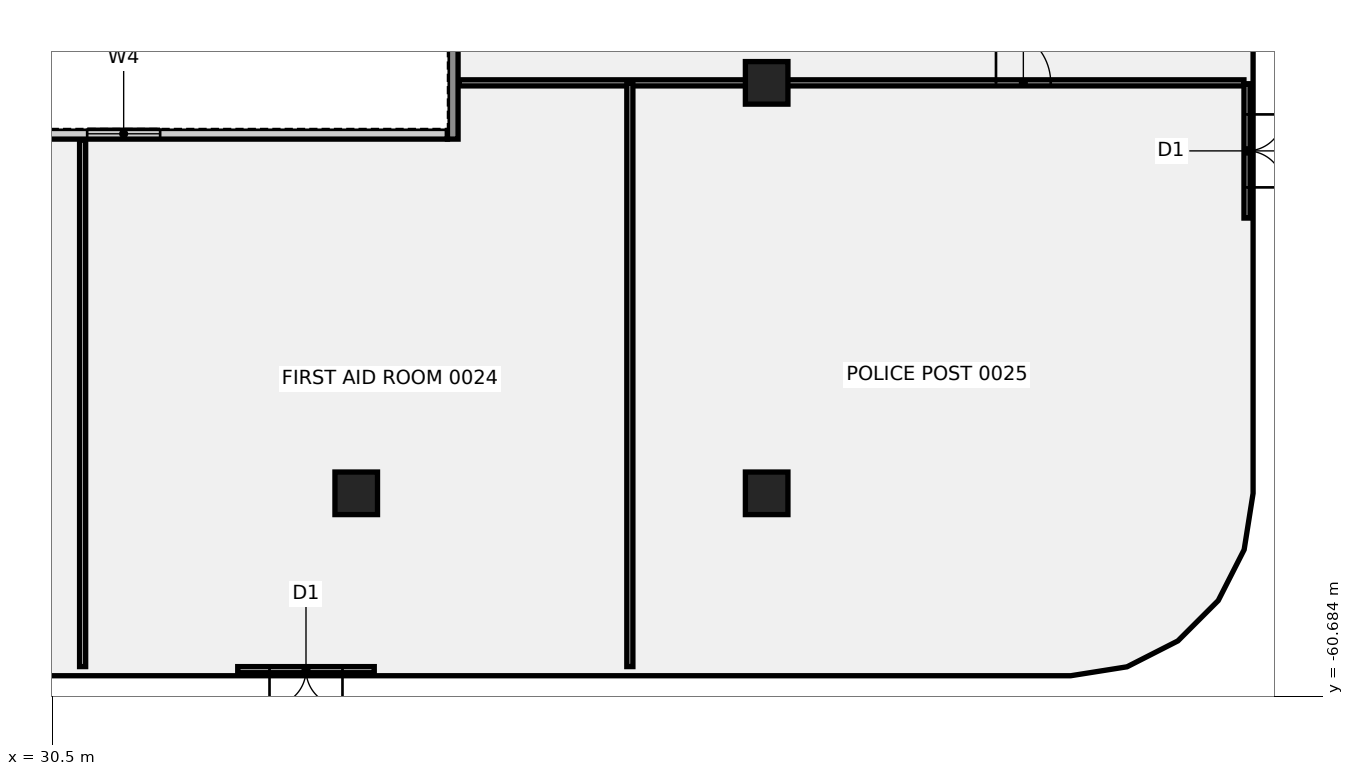
"""IFC4 building model, lengths in metres.
Left out: names, types, materials, properties, quantities, classifications, styles, units other than length and angle.
Written with IfcOpenShell. Run it as: python <this file> out.ifc"""

import sys

from ifc_helpers import new_model, si_unit, direction, frame, frame_2d, origin, origin_2d, place, context, subcontext, project, spatial, rectangle, extrude, element, fill, save


model = new_model("IFC4")
c1 = context("Model", 3, precision=1e-05, world=origin(), true_north=direction((0.0, 1.0)))
c2 = subcontext(c1, "Body", "Model", "MODEL_VIEW")
j1 = project(units=[si_unit("LENGTHUNIT", "METRE"), si_unit("PLANEANGLEUNIT", "RADIAN")], contexts=[c1])
p1 = place(None, origin())
s1 = spatial("IfcSite", under=j1, at=p1, CompositionType="ELEMENT")
p2 = place(p1, origin())
s2 = spatial("IfcBuilding", under=s1, at=p2, CompositionType="ELEMENT")
p3 = place(p2, origin())
s3 = spatial("IfcBuildingStorey", under=s2, at=p3, CompositionType="ELEMENT", Elevation=0.0)
for number, where, z_axis, x_axis in (
    (1, (40.5, -54.0, -0.55), (0.0, 0.0, 1.0), (1.0, 0.0, 0.0)),
    (2, (54.0, -54.0, -0.55), (0.0, 0.0, 1.0), (1.0, 0.0, 0.0)),
    (3, (54.0, -40.5, -0.55), (0.0, 0.0, 1.0), (1.0, 0.0, 0.0)),
):
    element("IfcColumn", number, at=place(p3, frame(where, z_axis=z_axis, x_axis=x_axis)), inside=s3, PredefinedType="COLUMN", context=c2, shape_type="SweptSolid", body=[
        extrude(rectangle(XDim=1.4, YDim=1.4, at=origin_2d()), origin(), (0.0, 0.0, 1.0), 9.05),
    ])
p4 = place(p3, frame((31.5, -59.699, 0.0), z_axis=(0.0, 0.0, 1.0), x_axis=(0.0, 1.0, 0.0)))
e4 = element("IfcWall", 4, at=p4, inside=s3, PredefinedType="PARTITIONING", context=c2, shape_type="SweptSolid", body=[
    extrude(rectangle(XDim=17.319, YDim=0.2, at=frame_2d((8.66, 0.0))), origin(), (0.0, 0.0, 1.0), 8.5),
])
p5 = place(p3, frame((43.88, -40.5, 0.0), z_axis=(0.0, 0.0, 1.0), x_axis=(1.0, 0.0, 0.0)))
e5 = element("IfcWall", 5, at=p5, inside=s3, PredefinedType="PARTITIONING", context=c2, shape_type="SweptSolid", body=[
    extrude(rectangle(XDim=25.819, YDim=0.2, at=frame_2d((12.91, 0.0))), origin(), (0.0, 0.0, 1.0), 8.5),
])
p6 = place(p5, frame((17.663, 0.0, 0.0)))
e6 = element("IfcOpeningElement", 6, at=p6, cuts=e5, PredefinedType="OPENING", context=c2, shape_type="SweptSolid", body=[
    extrude(rectangle(XDim=1.8, YDim=2.1, at=frame_2d((0.9, 1.05))), frame((0.0, 0.11, 0.0), z_axis=(0.0, -1.0, 0.0), x_axis=(1.0, 0.0, 0.0)), (0.0, 0.0, 1.0), 0.22),
])
p7 = place(p3, frame((49.5, -59.699, 0.0), z_axis=(0.0, 0.0, 1.0), x_axis=(0.0, 1.0, 0.0)))
e7 = element("IfcWall", 7, at=p7, inside=s3, PredefinedType="PARTITIONING", context=c2, shape_type="SweptSolid", body=[
    extrude(rectangle(XDim=19.199, YDim=0.2, at=frame_2d((9.6, 0.0))), origin(), (0.0, 0.0, 1.0), 8.5),
])
p8 = place(p3, frame((69.8, -44.947, 0.0), z_axis=(0.0, 0.0, 1.0), x_axis=(0.0, 1.0, 0.0)))
e8 = element("IfcWall", 8, at=p8, inside=s3, PredefinedType="SOLIDWALL", context=c2, shape_type="SweptSolid", body=[
    extrude(rectangle(XDim=4.419, YDim=0.2, at=frame_2d((2.209, 0.0))), origin(), (0.0, 0.0, 1.0), 2.9),
])
p9 = place(p8, frame((1.009, 0.0, 0.0)))
e9 = element("IfcOpeningElement", 9, at=p9, cuts=e8, PredefinedType="OPENING", context=c2, shape_type="SweptSolid", body=[
    extrude(rectangle(XDim=2.4, YDim=2.4, at=frame_2d((1.2, 1.2))), frame((0.0, 0.11, 0.0), z_axis=(0.0, -1.0, 0.0), x_axis=(1.0, 0.0, 0.0)), (0.0, 0.0, 1.0), 0.22),
])
p10 = place(p3, frame((36.603, -59.8, 0.0), z_axis=(0.0, 0.0, 1.0), x_axis=(1.0, 0.0, 0.0)))
e10 = element("IfcWall", 10, at=p10, inside=s3, PredefinedType="SOLIDWALL", context=c2, shape_type="SweptSolid", body=[
    extrude(rectangle(XDim=4.49, YDim=0.2, at=frame_2d((2.245, 0.0))), origin(), (0.0, 0.0, 1.0), 2.9),
])
p11 = place(p10, frame((1.045, 0.0, 0.0)))
e11 = element("IfcOpeningElement", 11, at=p11, cuts=e10, PredefinedType="OPENING", context=c2, shape_type="SweptSolid", body=[
    extrude(rectangle(XDim=2.4, YDim=2.4, at=frame_2d((1.2, 1.2))), frame((0.0, 0.11, 0.0), z_axis=(0.0, -1.0, 0.0), x_axis=(1.0, 0.0, 0.0)), (0.0, 0.0, 1.0), 0.22),
])
p12 = place(p3, frame((16.8, -42.175, 0.0), z_axis=(0.0, 0.0, 1.0), x_axis=(1.0, 0.0, 0.0)))
e12 = element("IfcWall", 12, at=p12, inside=s3, PredefinedType="SOLIDWALL", context=c2, shape_type="SweptSolid", body=[
    extrude(rectangle(XDim=26.7, YDim=0.35, at=frame_2d((13.35, 0.0))), origin(), (0.0, 0.0, 1.0), 8.5),
])
p13 = place(p12, frame((14.85, 0.0, 1.0)))
e13 = element("IfcOpeningElement", 13, at=p13, cuts=e12, PredefinedType="OPENING", context=c2, shape_type="SweptSolid", body=[
    extrude(rectangle(XDim=2.4, YDim=1.8, at=frame_2d((1.2, 0.9))), frame((0.0, 0.185, 0.0), z_axis=(0.0, -1.0, 0.0), x_axis=(1.0, 0.0, 0.0)), (0.0, 0.0, 1.0), 0.37),
])
p14 = place(p3, frame((43.675, -42.35, 0.0), z_axis=(0.0, 0.0, 1.0), x_axis=(0.0, 1.0, 0.0)))
e14 = element("IfcWall", 14, at=p14, inside=s3, PredefinedType="SOLIDWALL", context=c2, shape_type="SweptSolid", body=[
    extrude(rectangle(XDim=10.85, YDim=0.35, at=frame_2d((5.425, 0.0))), origin(), (0.0, 0.0, 1.0), 8.5),
])
p15 = place(p14, frame((3.35, 0.0, 0.0)))
e15 = element("IfcOpeningElement", 15, at=p15, cuts=e14, PredefinedType="OPENING", context=c2, shape_type="SweptSolid", body=[
    extrude(rectangle(XDim=1.8, YDim=2.4, at=frame_2d((0.9, 1.2))), frame((0.0, 0.185, 0.0), z_axis=(0.0, -1.0, 0.0), x_axis=(1.0, 0.0, 0.0)), (0.0, 0.0, 1.0), 0.37),
])
p16 = place(p6, origin())
e16 = element("IfcDoor", 16, at=p16, inside=s3, OperationType="SINGLE_SWING_RIGHT", PredefinedType="DOOR", context=c2, shape_type="SweptSolid", body=[
    extrude(rectangle(XDim=1.8, YDim=2.1, at=frame_2d((0.9, 1.05))), frame((0.0, 0.025, 0.0), z_axis=(0.0, -1.0, 0.0), x_axis=(1.0, 0.0, 0.0)), (0.0, 0.0, 1.0), 0.05),
])
fill(e6, e16)
p17 = place(p9, frame((2.4, 0.0, 0.0), z_axis=(0.0, 0.0, 1.0), x_axis=(-1.0, 0.0, 0.0)))
e17 = element("IfcDoor", 17, at=p17, inside=s3, OperationType="DOUBLE_DOOR_DOUBLE_SWING", PredefinedType="DOOR", context=c2, shape_type="SweptSolid", body=[
    extrude(rectangle(XDim=2.4, YDim=2.4, at=frame_2d((1.2, 1.2))), frame((0.0, 0.025, 0.0), z_axis=(0.0, -1.0, 0.0), x_axis=(1.0, 0.0, 0.0)), (0.0, 0.0, 1.0), 0.05),
])
fill(e9, e17)
p18 = place(p11, frame((2.4, 0.0, 0.0), z_axis=(0.0, 0.0, 1.0), x_axis=(-1.0, 0.0, 0.0)))
e18 = element("IfcDoor", 18, at=p18, inside=s3, OperationType="DOUBLE_DOOR_DOUBLE_SWING", PredefinedType="DOOR", context=c2, shape_type="SweptSolid", body=[
    extrude(rectangle(XDim=2.4, YDim=2.4, at=frame_2d((1.2, 1.2))), frame((0.0, 0.025, 0.0), z_axis=(0.0, -1.0, 0.0), x_axis=(1.0, 0.0, 0.0)), (0.0, 0.0, 1.0), 0.05),
])
fill(e11, e18)
p19 = place(p13, origin())
e19 = element("IfcWindow", 19, at=p19, inside=s3, PartitioningType="SINGLE_PANEL", PredefinedType="WINDOW", context=c2, shape_type="SweptSolid", body=[
    extrude(rectangle(XDim=2.4, YDim=1.8, at=frame_2d((1.2, 0.9))), frame((0.0, 0.03, 0.0), z_axis=(0.0, -1.0, 0.0), x_axis=(1.0, 0.0, 0.0)), (0.0, 0.0, 1.0), 0.06),
])
fill(e13, e19)
save(model, sys.argv[1])
